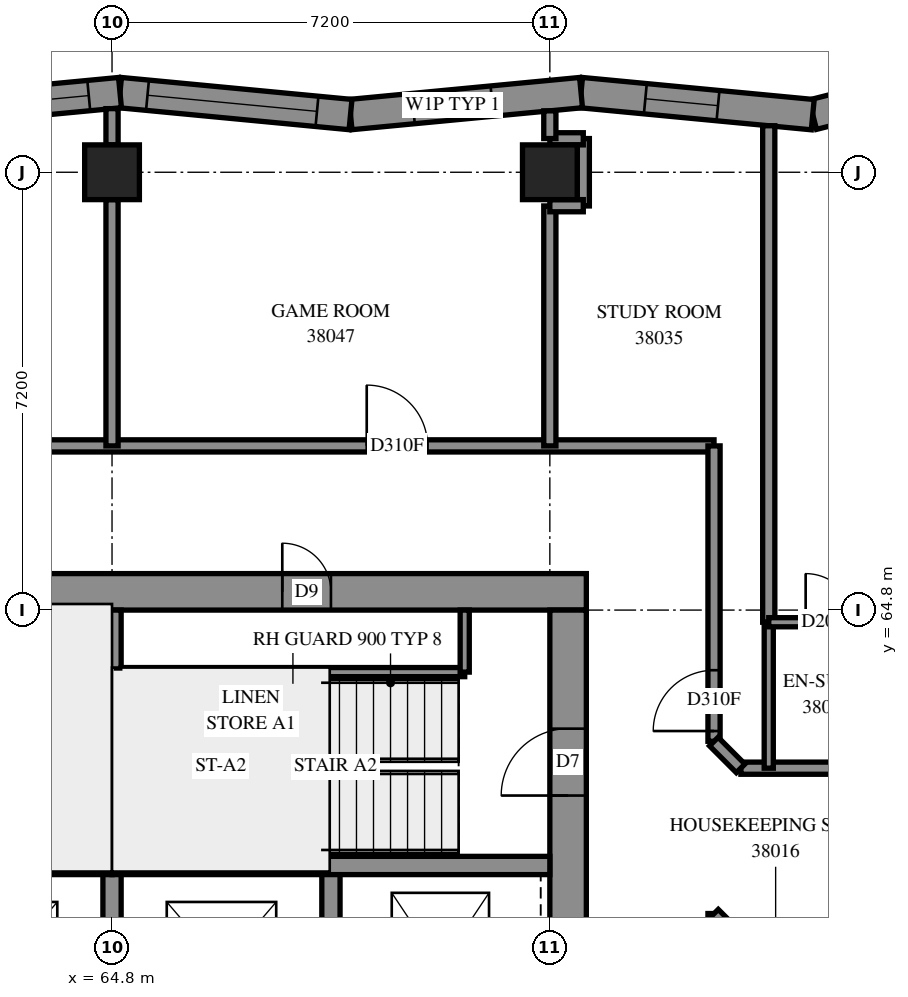
"""IFC4 building model, lengths in metres.
Left out: names, types, materials, properties, quantities, classifications, styles, units other than length and angle.
Written with IfcOpenShell. Run it as: python <this file> out.ifc"""

import sys

from ifc_helpers import new_model, si_unit, direction, frame, frame_2d, origin, origin_2d, place, context, subcontext, project, spatial, polyline, rectangle, outline, extrude, element, fill, save


model = new_model("IFC4")
c1 = context("Model", 3, precision=1e-05, world=origin(), true_north=direction((0.0, 1.0)))
c2 = subcontext(c1, "Body", "Model", "MODEL_VIEW")
j1 = project(units=[si_unit("LENGTHUNIT", "METRE"), si_unit("PLANEANGLEUNIT", "RADIAN")], contexts=[c1])
p1 = place(None, origin())
s1 = spatial("IfcSite", under=j1, at=p1, CompositionType="ELEMENT")
p2 = place(p1, origin())
s2 = spatial("IfcBuilding", under=s1, at=p2, CompositionType="ELEMENT")
p3 = place(p2, frame((0.0, 0.0, 142.2)))
s3 = spatial("IfcBuildingStorey", under=s2, at=p3, CompositionType="ELEMENT", Elevation=142.2)
for number, where, z_axis, x_axis in (
    (1, (64.8, 72.0, 0.0), (0.0, 0.0, 1.0), (1.0, 0.0, 0.0)),
    (2, (72.0, 72.0, 0.0), (0.0, 0.0, 1.0), (1.0, 0.0, 0.0)),
):
    element("IfcColumn", number, at=place(p3, frame(where, z_axis=z_axis, x_axis=x_axis)), inside=s3, PredefinedType="COLUMN", context=c2, shape_type="SweptSolid", body=[
        extrude(rectangle(XDim=0.9, YDim=0.9, at=origin_2d()), origin(), (0.0, 0.0, 1.0), 3.1),
    ])
p4 = place(p3, frame((57.0, 65.1, -0.3), z_axis=(0.0, 0.0, 1.0), x_axis=(1.0, 0.0, 0.0)))
e3 = element("IfcWall", 3, at=p4, inside=s3, PredefinedType="SHEAR", context=c2, shape_type="SweptSolid", body=[
    extrude(rectangle(XDim=15.6, YDim=0.6, at=frame_2d((7.8, 0.0))), origin(), (0.0, 0.0, 1.0), 2.7),
])
p5 = place(p4, frame((10.6, 0.0, 0.3)))
e4 = element("IfcOpeningElement", 4, at=p5, cuts=e3, PredefinedType="OPENING", context=c2, shape_type="SweptSolid", body=[
    extrude(rectangle(XDim=0.8, YDim=2.1, at=frame_2d((0.4, 1.05))), frame((0.0, 0.31, 0.0), z_axis=(0.0, -1.0, 0.0), x_axis=(1.0, 0.0, 0.0)), (0.0, 0.0, 1.0), 0.62),
])
p6 = place(p3, frame((72.3, 50.4, -0.3), z_axis=(0.0, 0.0, 1.0), x_axis=(0.0, 1.0, 0.0)))
e5 = element("IfcWall", 5, at=p6, inside=s3, PredefinedType="SHEAR", context=c2, shape_type="SweptSolid", body=[
    extrude(rectangle(XDim=14.4, YDim=0.6, at=frame_2d((7.2, 0.0))), origin(), (0.0, 0.0, 1.0), 2.7),
])
p7 = place(p6, frame((4.55, 0.0, 0.3)))
e6 = element("IfcOpeningElement", 6, at=p7, cuts=e5, PredefinedType="OPENING", context=c2, shape_type="SweptSolid", body=[
    extrude(rectangle(XDim=1.1, YDim=2.1, at=frame_2d((0.55, 1.05))), frame((0.0, 0.31, 0.0), z_axis=(0.0, -1.0, 0.0), x_axis=(1.0, 0.0, 0.0)), (0.0, 0.0, 1.0), 0.62),
])
p8 = place(p6, frame((11.35, 0.0, 0.3)))
e7 = element("IfcOpeningElement", 7, at=p8, cuts=e5, PredefinedType="OPENING", context=c2, shape_type="SweptSolid", body=[
    extrude(rectangle(XDim=1.1, YDim=2.1, at=frame_2d((0.55, 1.05))), frame((0.0, 0.31, 0.0), z_axis=(0.0, -1.0, 0.0), x_axis=(1.0, 0.0, 0.0)), (0.0, 0.0, 1.0), 0.62),
])
for number, where, z_axis, x_axis in (
    (8, (64.8, 57.3, 0.0), (0.0, 0.0, 1.0), (0.0, 1.0, 0.0)),
    (9, (68.4, 57.3, 0.0), (0.0, 0.0, 1.0), (0.0, 1.0, 0.0)),
):
    element("IfcWall", number, at=place(p3, frame(where, z_axis=z_axis, x_axis=x_axis)), inside=s3, PredefinedType="SOLIDWALL", context=c2, shape_type="SweptSolid", body=[
        extrude(rectangle(XDim=3.3, YDim=0.3, at=frame_2d((1.65, 0.0))), origin(), (0.0, 0.0, 1.0), 3.1),
    ])
for number, where, z_axis, x_axis in (
    (10, (57.6, 60.6, 0.0), (0.0, 0.0, 1.0), (1.0, 0.0, 0.0)),
    (11, (64.8, 60.6, 0.0), (0.0, 0.0, 1.0), (1.0, 0.0, 0.0)),
):
    element("IfcWall", number, at=place(p3, frame(where, z_axis=z_axis, x_axis=x_axis)), inside=s3, PredefinedType="SOLIDWALL", context=c2, shape_type="SweptSolid", body=[
        extrude(rectangle(XDim=7.2, YDim=0.3, at=frame_2d((3.6, 0.0))), origin(), (0.0, 0.0, 1.0), 3.1),
    ])
p9 = place(p3, frame((64.8, 60.6, 0.0), z_axis=(0.0, 0.0, 1.0), x_axis=(0.0, 1.0, 0.0)))
e12 = element("IfcWall", 12, at=p9, inside=s3, PredefinedType="SOLIDWALL", context=c2, shape_type="SweptSolid", body=[
    extrude(rectangle(XDim=4.2, YDim=0.3, at=frame_2d((2.1, 0.0))), origin(), (0.0, 0.0, 1.0), 3.1),
])
p10 = place(p3, frame((79.97, 73.871, 0.0), z_axis=(0.0, 0.0, 1.0), x_axis=(-0.9693397955, -0.2457241559, 0.0)))
e13 = element("IfcWall", 13, at=p10, inside=s3, PredefinedType="SOLIDWALL", context=c2, shape_type="SweptSolid", body=[
    extrude(outline(polyline([(-0.192, -0.25), (3.719, -0.25), (3.805, 0.25), (0.192, 0.25), (-0.192, -0.25)])), origin(), (0.0, 0.0, 1.0), 3.1),
])
p11 = place(p10, frame((1.078, 0.0, 0.45)))
e14 = element("IfcOpeningElement", 14, at=p11, cuts=e13, PredefinedType="OPENING", context=c2, shape_type="SweptSolid", body=[
    extrude(rectangle(XDim=1.2, YDim=2.5, at=frame_2d((0.6, 1.25))), frame((0.0, 0.26, 0.0), z_axis=(0.0, -1.0, 0.0), x_axis=(1.0, 0.0, 0.0)), (0.0, 0.0, 1.0), 0.52),
])
p12 = place(p3, frame((76.324, 72.947, 0.0), z_axis=(0.0, 0.0, 1.0), x_axis=(-0.99549559, 0.0948078598, 0.0)))
e15 = element("IfcWall", 15, at=p12, inside=s3, PredefinedType="SOLIDWALL", context=c2, shape_type="SweptSolid", body=[
    extrude(outline(polyline([(0.043, -0.25), (3.852, -0.25), (3.804, 0.25), (-0.043, 0.25), (0.043, -0.25)])), origin(), (0.0, 0.0, 1.0), 3.1),
])
p13 = place(p12, frame((1.565, 0.0, 0.45)))
e16 = element("IfcOpeningElement", 16, at=p13, cuts=e15, PredefinedType="OPENING", context=c2, shape_type="SweptSolid", body=[
    extrude(rectangle(XDim=1.2, YDim=2.5, at=frame_2d((0.6, 1.25))), frame((0.0, 0.26, 0.0), z_axis=(0.0, -1.0, 0.0), x_axis=(1.0, 0.0, 0.0)), (0.0, 0.0, 1.0), 0.52),
])
p14 = place(p3, frame((72.513, 73.31, 0.0), z_axis=(0.0, 0.0, 1.0), x_axis=(-0.9954966527, -0.0947967005, 0.0)))
e17 = element("IfcWall", 17, at=p14, inside=s3, PredefinedType="SOLIDWALL", context=c2, shape_type="SweptSolid", body=[
    extrude(outline(polyline([(-0.024, -0.25), (3.784, -0.25), (3.832, 0.25), (0.024, 0.25), (-0.024, -0.25)])), origin(), (0.0, 0.0, 1.0), 3.1),
])
p15 = place(p14, frame((1.471, 0.0, 0.5)))
e18 = element("IfcOpeningElement", 18, at=p15, cuts=e17, PredefinedType="OPENING", context=c2, shape_type="SweptSolid", body=[
    extrude(rectangle(XDim=1.3, YDim=2.45, at=frame_2d((0.65, 1.225))), frame((0.0, 0.26, 0.0), z_axis=(0.0, -1.0, 0.0), x_axis=(1.0, 0.0, 0.0)), (0.0, 0.0, 1.0), 0.52),
])
p16 = place(p3, frame((68.722, 72.949, 0.0), z_axis=(0.0, 0.0, 1.0), x_axis=(-0.9954966527, 0.0947967005, 0.0)))
e19 = element("IfcWall", 19, at=p16, inside=s3, PredefinedType="SOLIDWALL", context=c2, shape_type="SweptSolid", body=[
    extrude(outline(polyline([(0.024, -0.25), (3.832, -0.25), (3.784, 0.25), (-0.024, 0.25), (0.024, -0.25)])), origin(), (0.0, 0.0, 1.0), 3.1),
])
p17 = place(p16, frame((0.554, 0.0, 0.45)))
e20 = element("IfcOpeningElement", 20, at=p17, cuts=e19, PredefinedType="OPENING", context=c2, shape_type="SweptSolid", body=[
    extrude(rectangle(XDim=2.8, YDim=2.5, at=frame_2d((1.4, 1.25))), frame((0.0, 0.26, 0.0), z_axis=(0.0, -1.0, 0.0), x_axis=(1.0, 0.0, 0.0)), (0.0, 0.0, 1.0), 0.52),
])
p18 = place(p3, frame((64.931, 73.31, 0.0), z_axis=(0.0, 0.0, 1.0), x_axis=(-0.9954966527, -0.0947967005, 0.0)))
e21 = element("IfcWall", 21, at=p18, inside=s3, PredefinedType="SOLIDWALL", context=c2, shape_type="SweptSolid", body=[
    extrude(outline(polyline([(-0.024, -0.25), (3.784, -0.25), (3.832, 0.25), (0.024, 0.25), (-0.024, -0.25)])), origin(), (0.0, 0.0, 1.0), 3.1),
])
p19 = place(p18, frame((0.516, 0.0, 0.45)))
e22 = element("IfcOpeningElement", 22, at=p19, cuts=e21, PredefinedType="OPENING", context=c2, shape_type="SweptSolid", body=[
    extrude(rectangle(XDim=2.8, YDim=2.5, at=frame_2d((1.4, 1.25))), frame((0.0, 0.26, 0.0), z_axis=(0.0, -1.0, 0.0), x_axis=(1.0, 0.0, 0.0)), (0.0, 0.0, 1.0), 0.52),
])
p20 = place(p3, frame((64.95, 63.78, 0.0), z_axis=(0.0, 0.0, 1.0), x_axis=(1.0, 0.0, 0.0)))
e23 = element("IfcWall", 23, at=p20, inside=s3, PredefinedType="PARTITIONING", context=c2, shape_type="SweptSolid", body=[
    extrude(rectangle(XDim=5.65, YDim=0.15, at=frame_2d((2.825, 0.0))), origin(), (0.0, 0.0, 1.0), 3.1),
])
p21 = place(p3, frame((70.6, 63.78, 0.0), z_axis=(0.0, 0.0, 1.0), x_axis=(0.0, 1.0, 0.0)))
e24 = element("IfcWall", 24, at=p21, inside=s3, PredefinedType="PARTITIONING", context=c2, shape_type="SweptSolid", body=[
    extrude(rectangle(XDim=1.02, YDim=0.15, at=frame_2d((0.51, 0.0))), origin(), (0.0, 0.0, 1.0), 3.1),
])
p22 = place(p3, frame((54.9, 67.5, 0.0), z_axis=(0.0, 0.0, 1.0), x_axis=(1.0, 0.0, 0.0)))
e25 = element("IfcWall", 25, at=p22, inside=s3, PredefinedType="PARTITIONING", context=c2, shape_type="SweptSolid", body=[
    extrude(rectangle(XDim=19.8, YDim=0.2, at=frame_2d((9.9, 0.0))), origin(), (0.0, 0.0, 1.0), 3.1),
])
p23 = place(p22, frame((6.586, 0.0, 0.0)))
e26 = element("IfcOpeningElement", 26, at=p23, cuts=e25, PredefinedType="OPENING", context=c2, shape_type="SweptSolid", body=[
    extrude(rectangle(XDim=1.0, YDim=2.1, at=frame_2d((0.5, 1.05))), frame((0.0, 0.11, 0.0), z_axis=(0.0, -1.0, 0.0), x_axis=(1.0, 0.0, 0.0)), (0.0, 0.0, 1.0), 0.22),
])
p24 = place(p22, frame((14.089, 0.0, 0.0)))
e27 = element("IfcOpeningElement", 27, at=p24, cuts=e25, PredefinedType="OPENING", context=c2, shape_type="SweptSolid", body=[
    extrude(rectangle(XDim=1.0, YDim=2.1, at=frame_2d((0.5, 1.05))), frame((0.0, 0.11, 0.0), z_axis=(0.0, -1.0, 0.0), x_axis=(1.0, 0.0, 0.0)), (0.0, 0.0, 1.0), 0.22),
])
p25 = place(p3, frame((75.6, 64.6, 0.0), z_axis=(0.0, 0.0, 1.0), x_axis=(0.0, 1.0, 0.0)))
e28 = element("IfcWall", 28, at=p25, inside=s3, PredefinedType="PARTITIONING", context=c2, shape_type="SweptSolid", body=[
    extrude(rectangle(XDim=8.165, YDim=0.2, at=frame_2d((4.082, 0.0))), origin(), (0.0, 0.0, 1.0), 3.1),
])
p26 = place(p3, frame((74.7, 62.642, 0.0), z_axis=(0.0, 0.0, 1.0), x_axis=(0.0, 1.0, 0.0)))
e29 = element("IfcWall", 29, at=p26, inside=s3, PredefinedType="PARTITIONING", context=c2, shape_type="SweptSolid", body=[
    extrude(rectangle(XDim=4.858, YDim=0.2, at=frame_2d((2.429, 0.0))), origin(), (0.0, 0.0, 1.0), 3.1),
])
p27 = place(p26, frame((0.169, 0.0, 0.0)))
e30 = element("IfcOpeningElement", 30, at=p27, cuts=e29, PredefinedType="OPENING", context=c2, shape_type="SweptSolid", body=[
    extrude(rectangle(XDim=1.0, YDim=2.1, at=frame_2d((0.5, 1.05))), frame((0.0, 0.11, 0.0), z_axis=(0.0, -1.0, 0.0), x_axis=(1.0, 0.0, 0.0)), (0.0, 0.0, 1.0), 0.22),
])
p28 = place(p3, frame((74.7, 55.002, 0.0), z_axis=(0.0, 0.0, 1.0), x_axis=(0.0, 1.0, 0.0)))
e31 = element("IfcWall", 31, at=p28, inside=s3, PredefinedType="PARTITIONING", context=c2, shape_type="SweptSolid", body=[
    extrude(rectangle(XDim=4.808, YDim=0.2, at=frame_2d((2.404, 0.0))), origin(), (0.0, 0.0, 1.0), 3.1),
])
p29 = place(p3, frame((75.142, 62.2, 0.0), z_axis=(0.0, 0.0, 1.0), x_axis=(1.0, 0.0, 0.0)))
e32 = element("IfcWall", 32, at=p29, inside=s3, PredefinedType="PARTITIONING", context=c2, shape_type="SweptSolid", body=[
    extrude(rectangle(XDim=4.058, YDim=0.2, at=frame_2d((2.029, 0.0))), origin(), (0.0, 0.0, 1.0), 3.1),
])
p30 = place(p29, frame((2.758, 0.0, 0.0)))
e33 = element("IfcOpeningElement", 33, at=p30, cuts=e32, PredefinedType="OPENING", context=c2, shape_type="SweptSolid", body=[
    extrude(rectangle(XDim=0.9, YDim=2.1, at=frame_2d((0.45, 1.05))), frame((0.0, 0.11, 0.0), z_axis=(0.0, -1.0, 0.0), x_axis=(1.0, 0.0, 0.0)), (0.0, 0.0, 1.0), 0.22),
])
p31 = place(p3, frame((64.8, 67.5, 0.0), z_axis=(0.0, 0.0, 1.0), x_axis=(0.0, 1.0, 0.0)))
e34 = element("IfcWall", 34, at=p31, inside=s3, PredefinedType="PARTITIONING", context=c2, shape_type="SweptSolid", body=[
    extrude(rectangle(XDim=4.05, YDim=0.2, at=frame_2d((2.025, 0.0))), origin(), (0.0, 0.0, 1.0), 3.1),
])
p32 = place(p3, frame((74.699, 59.807, 0.0), z_axis=(0.0, 0.0, 1.0), x_axis=(0.7071067812, -0.7071067812, 0.0)))
e35 = element("IfcWall", 35, at=p32, inside=s3, PredefinedType="PARTITIONING", context=c2, shape_type="SweptSolid", body=[
    extrude(rectangle(XDim=3.957, YDim=0.2, at=frame_2d((1.978, 0.0))), origin(), (0.0, 0.0, 1.0), 3.1),
])
p33 = place(p3, frame((72.0, 67.5, 0.0), z_axis=(0.0, 0.0, 1.0), x_axis=(0.0, 1.0, 0.0)))
e36 = element("IfcWall", 36, at=p33, inside=s3, PredefinedType="PARTITIONING", context=c2, shape_type="SweptSolid", body=[
    extrude(rectangle(XDim=3.946, YDim=0.2, at=frame_2d((1.973, 0.0))), origin(), (0.0, 0.0, 1.0), 3.1),
])
p34 = place(p3, frame((75.6, 62.2, 0.0), z_axis=(0.0, 0.0, 1.0), x_axis=(0.0, 1.0, 0.0)))
e37 = element("IfcWall", 37, at=p34, inside=s3, PredefinedType="PARTITIONING", context=c2, shape_type="SweptSolid", body=[
    extrude(rectangle(XDim=2.4, YDim=0.15, at=frame_2d((1.2, 0.0))), origin(), (0.0, 0.0, 1.0), 3.1),
])
p35 = place(p3, frame((75.6, 64.6, 0.0), z_axis=(0.0, 0.0, 1.0), x_axis=(1.0, 0.0, 0.0)))
e38 = element("IfcWall", 38, at=p35, inside=s3, PredefinedType="PARTITIONING", context=c2, shape_type="SweptSolid", body=[
    extrude(rectangle(XDim=1.9, YDim=0.15, at=frame_2d((0.95, 0.0))), origin(), (0.0, 0.0, 1.0), 3.1),
])
p36 = place(p35, frame((0.607, 0.0, 0.0)))
e39 = element("IfcOpeningElement", 39, at=p36, cuts=e38, PredefinedType="OPENING", context=c2, shape_type="SweptSolid", body=[
    extrude(rectangle(XDim=0.8, YDim=2.1, at=frame_2d((0.4, 1.05))), frame((0.0, 0.085, 0.0), z_axis=(0.0, -1.0, 0.0), x_axis=(1.0, 0.0, 0.0)), (0.0, 0.0, 1.0), 0.17),
])
p37 = place(p3, frame((72.55, 71.446, 0.0), z_axis=(0.0, 0.0, 1.0), x_axis=(0.0, 1.0, 0.0)))
e40 = element("IfcWall", 40, at=p37, inside=s3, PredefinedType="PARTITIONING", context=c2, shape_type="SweptSolid", body=[
    extrude(rectangle(XDim=1.108, YDim=0.2, at=frame_2d((0.554, 0.0))), origin(), (0.0, 0.0, 1.0), 3.1),
])
p38 = place(p3, frame((74.697, 62.637, 0.0), z_axis=(0.0, 0.0, 1.0), x_axis=(0.7071067812, -0.7071067812, 0.0)))
e41 = element("IfcWall", 41, at=p38, inside=s3, PredefinedType="PARTITIONING", context=c2, shape_type="SweptSolid", body=[
    extrude(rectangle(XDim=0.622, YDim=0.2, at=frame_2d((0.311, 0.0))), origin(), (0.0, 0.0, 1.0), 3.1),
])
for number, where, z_axis, x_axis in (
    (42, (72.0, 71.45, 0.0), (0.0, 0.0, 1.0), (1.0, 0.0, 0.0)),
    (43, (72.0, 72.55, 0.0), (0.0, 0.0, 1.0), (1.0, 0.0, 0.0)),
):
    element("IfcWall", number, at=place(p3, frame(where, z_axis=z_axis, x_axis=x_axis)), inside=s3, PredefinedType="PARTITIONING", context=c2, shape_type="SweptSolid", body=[
        extrude(rectangle(XDim=0.55, YDim=0.2, at=frame_2d((0.275, 0.0))), origin(), (0.0, 0.0, 1.0), 3.1),
    ])
p39 = place(p3, frame((64.8, 72.45, 0.0), z_axis=(0.0, 0.0, 1.0), x_axis=(0.0, 1.0, 0.0)))
e44 = element("IfcWall", 44, at=p39, inside=s3, PredefinedType="PARTITIONING", context=c2, shape_type="SweptSolid", body=[
    extrude(rectangle(XDim=0.596, YDim=0.2, at=frame_2d((0.298, 0.0))), origin(), (0.0, 0.0, 1.0), 3.1),
])
p40 = place(p3, frame((72.0, 72.554, 0.0), z_axis=(0.0, 0.0, 1.0), x_axis=(0.0, 1.0, 0.0)))
e45 = element("IfcWall", 45, at=p40, inside=s3, PredefinedType="PARTITIONING", context=c2, shape_type="SweptSolid", body=[
    extrude(rectangle(XDim=0.456, YDim=0.2, at=frame_2d((0.228, 0.0))), origin(), (0.0, 0.0, 1.0), 3.1),
])
p41 = place(p13, origin())
e46 = element("IfcWindow", 46, at=p41, inside=s3, PartitioningType="SINGLE_PANEL", PredefinedType="WINDOW", context=c2, shape_type="SweptSolid", body=[
    extrude(rectangle(XDim=1.2, YDim=2.5, at=frame_2d((0.6, 1.25))), frame((0.0, 0.18, 0.0), z_axis=(0.0, -1.0, 0.0), x_axis=(1.0, 0.0, 0.0)), (0.0, 0.0, 1.0), 0.06),
])
fill(e16, e46)
p42 = place(p17, origin())
e47 = element("IfcWindow", 47, at=p42, inside=s3, PartitioningType="SINGLE_PANEL", PredefinedType="WINDOW", context=c2, shape_type="SweptSolid", body=[
    extrude(rectangle(XDim=2.8, YDim=2.5, at=frame_2d((1.4, 1.25))), frame((0.0, 0.18, 0.0), z_axis=(0.0, -1.0, 0.0), x_axis=(1.0, 0.0, 0.0)), (0.0, 0.0, 1.0), 0.06),
])
fill(e20, e47)
p43 = place(p19, origin())
e48 = element("IfcWindow", 48, at=p43, inside=s3, PartitioningType="SINGLE_PANEL", PredefinedType="WINDOW", context=c2, shape_type="SweptSolid", body=[
    extrude(rectangle(XDim=2.8, YDim=2.5, at=frame_2d((1.4, 1.25))), frame((0.0, 0.18, 0.0), z_axis=(0.0, -1.0, 0.0), x_axis=(1.0, 0.0, 0.0)), (0.0, 0.0, 1.0), 0.06),
])
fill(e22, e48)
p44 = place(p5, origin())
e49 = element("IfcDoor", 49, at=p44, inside=s3, OperationType="SINGLE_SWING_RIGHT", PredefinedType="DOOR", context=c2, shape_type="SweptSolid", body=[
    extrude(rectangle(XDim=0.8, YDim=2.1, at=frame_2d((0.4, 1.05))), frame((0.0, 0.025, 0.0), z_axis=(0.0, -1.0, 0.0), x_axis=(1.0, 0.0, 0.0)), (0.0, 0.0, 1.0), 0.05),
])
fill(e4, e49)
p45 = place(p8, origin())
e50 = element("IfcDoor", 50, at=p45, inside=s3, OperationType="SINGLE_SWING_RIGHT", PredefinedType="DOOR", context=c2, shape_type="SweptSolid", body=[
    extrude(rectangle(XDim=1.1, YDim=2.1, at=frame_2d((0.55, 1.05))), frame((0.0, 0.025, 0.0), z_axis=(0.0, -1.0, 0.0), x_axis=(1.0, 0.0, 0.0)), (0.0, 0.0, 1.0), 0.05),
])
fill(e7, e50)
p46 = place(p27, origin())
e51 = element("IfcDoor", 51, at=p46, inside=s3, OperationType="SINGLE_SWING_RIGHT", PredefinedType="DOOR", context=c2, shape_type="SweptSolid", body=[
    extrude(rectangle(XDim=1.0, YDim=2.1, at=frame_2d((0.5, 1.05))), frame((0.0, 0.025, 0.0), z_axis=(0.0, -1.0, 0.0), x_axis=(1.0, 0.0, 0.0)), (0.0, 0.0, 1.0), 0.05),
])
fill(e30, e51)
p47 = place(p36, origin())
e52 = element("IfcDoor", 52, at=p47, inside=s3, OperationType="SINGLE_SWING_RIGHT", PredefinedType="DOOR", context=c2, shape_type="SweptSolid", body=[
    extrude(rectangle(XDim=0.8, YDim=2.1, at=frame_2d((0.4, 1.05))), frame((0.0, 0.025, 0.0), z_axis=(0.0, -1.0, 0.0), x_axis=(1.0, 0.0, 0.0)), (0.0, 0.0, 1.0), 0.05),
])
fill(e39, e52)
p48 = place(p24, origin())
e53 = element("IfcDoor", 53, at=p48, inside=s3, OperationType="SINGLE_SWING_RIGHT", PredefinedType="DOOR", context=c2, shape_type="SweptSolid", body=[
    extrude(rectangle(XDim=1.0, YDim=2.1, at=frame_2d((0.5, 1.05))), frame((0.0, 0.025, 0.0), z_axis=(0.0, -1.0, 0.0), x_axis=(1.0, 0.0, 0.0)), (0.0, 0.0, 1.0), 0.05),
])
fill(e27, e53)
p49 = place(p15, origin())
e54 = element("IfcWindow", 54, at=p49, inside=s3, PartitioningType="SINGLE_PANEL", PredefinedType="WINDOW", context=c2, shape_type="SweptSolid", body=[
    extrude(rectangle(XDim=1.3, YDim=2.45, at=frame_2d((0.65, 1.225))), frame((0.0, 0.18, 0.0), z_axis=(0.0, -1.0, 0.0), x_axis=(1.0, 0.0, 0.0)), (0.0, 0.0, 1.0), 0.06),
])
fill(e18, e54)
save(model, sys.argv[1])
